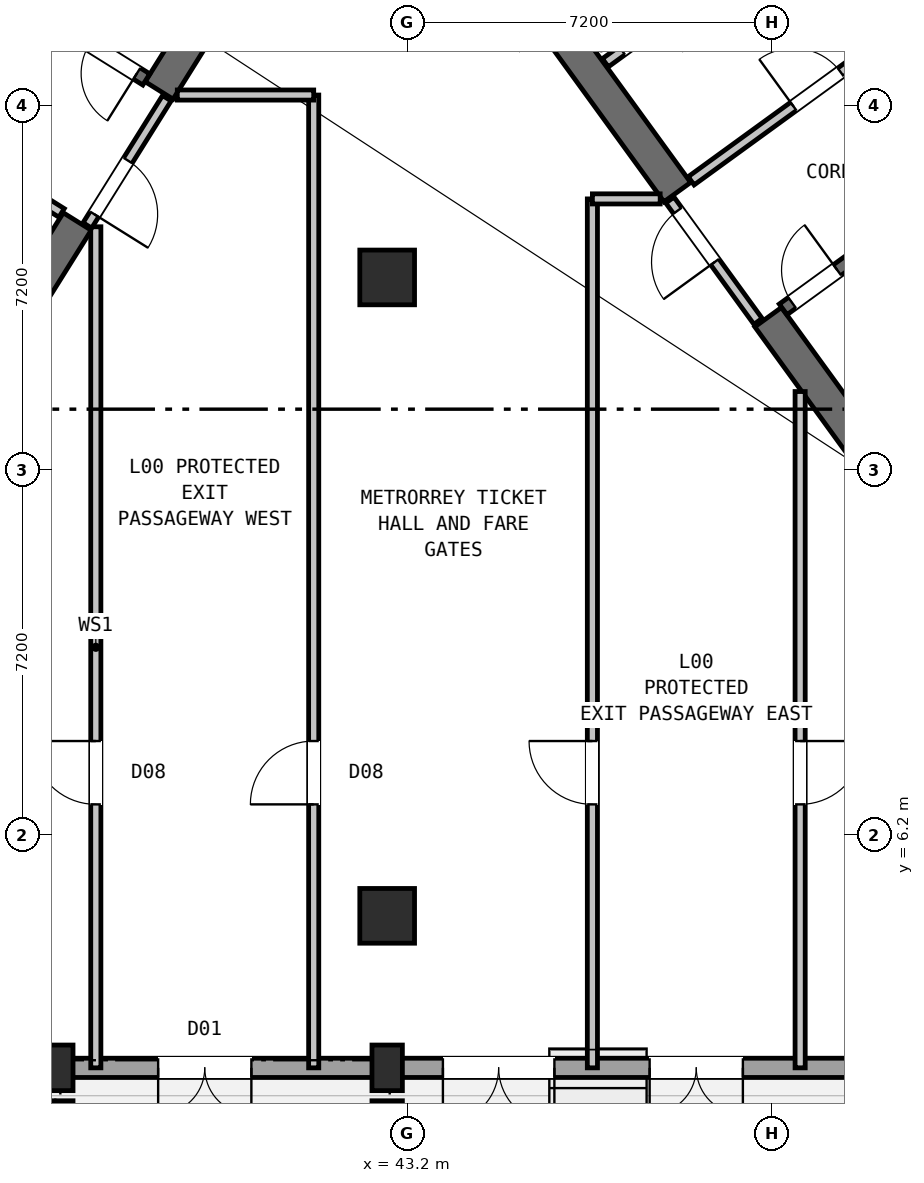
"""IFC4 building model, lengths in metres.
Left out: names, types, materials, properties, quantities, classifications, styles, units other than length and angle.
Written with IfcOpenShell. Run it as: python <this file> out.ifc"""

import sys

from ifc_helpers import new_model, si_unit, direction, frame, frame_2d, origin, origin_2d, place, context, subcontext, project, spatial, rectangle, hollow_rectangle, extrude, source, transform, mapped, element, fill, save


model = new_model("IFC4")
c1 = context("Model", 3, precision=1e-05, world=origin(), true_north=direction((0.0, 1.0)))
c2 = subcontext(c1, "Body", "Model", "MODEL_VIEW")
j1 = project(units=[si_unit("LENGTHUNIT", "METRE"), si_unit("PLANEANGLEUNIT", "RADIAN")], contexts=[c1])
p1 = place(None, origin())
s1 = spatial("IfcSite", under=j1, at=p1, CompositionType="ELEMENT")
p2 = place(p1, origin())
s2 = spatial("IfcBuilding", under=s1, at=p2, CompositionType="ELEMENT")
p3 = place(p2, origin())
s3 = spatial("IfcBuildingStorey", under=s2, at=p3, CompositionType="ELEMENT", Elevation=0.0)
p4 = place(p3, frame((40.168, 23.88, 0.0), z_axis=(0.0, 0.0, 1.0), x_axis=(-0.529893103397, -0.8480644427, 0.0)))
e1 = element("IfcWall", 1, at=p4, inside=s3, PredefinedType="SHEAR", context=c2, shape_type="SweptSolid", body=[
    extrude(rectangle(XDim=3.525, YDim=0.65, at=frame_2d((1.763, 0.0))), origin(), (0.0, 0.0, 1.0), 5.05),
])
p5 = place(p3, frame((36.683, 18.304, 0.0), z_axis=(0.0, 0.0, 1.0), x_axis=(-0.529899109053, -0.848060690178, 0.0)))
e2 = element("IfcWall", 2, at=p5, inside=s3, PredefinedType="SHEAR", context=c2, shape_type="SweptSolid", body=[
    extrude(rectangle(XDim=6.375, YDim=0.65, at=frame_2d((3.188, 0.0))), origin(), (0.0, 0.0, 1.0), 5.05),
])
p6 = place(p3, frame((52.39, 13.564, 0.0), z_axis=(0.0, 0.0, 1.0), x_axis=(-0.58779688989, 0.809008539037, 0.0)))
e3 = element("IfcWall", 3, at=p6, inside=s3, PredefinedType="SHEAR", context=c2, shape_type="SweptSolid", body=[
    extrude(rectangle(XDim=3.525, YDim=0.65, at=frame_2d((1.763, 0.0))), origin(), (0.0, 0.0, 1.0), 5.05),
])
p7 = place(p3, frame((48.526, 18.884, 0.0), z_axis=(0.0, 0.0, 1.0), x_axis=(-0.58777996584, 0.809020835181, 0.0)))
e4 = element("IfcWall", 4, at=p7, inside=s3, PredefinedType="SHEAR", context=c2, shape_type="SweptSolid", body=[
    extrude(rectangle(XDim=6.375, YDim=0.65, at=frame_2d((3.188, 0.0))), origin(), (0.0, 0.0, 1.0), 5.05),
])
m1 = source(origin(), c2, "Body", "SweptSolid", [
    extrude(hollow_rectangle(XDim=1.08, YDim=1.08, WallThickness=0.04, at=origin_2d()), origin(), (0.0, 0.0, 1.0), 5.4),
])
for number, where, z_axis, x_axis in (
    (5, (42.8, 4.6, 0.0), (0.0, 0.0, 1.0), (1.0, 0.0, 0.0)),
    (6, (42.8, 17.2, 0.0), (0.0, 0.0, 1.0), (1.0, 0.0, 0.0)),
):
    element("IfcColumn", number, at=place(p3, frame(where, z_axis=z_axis, x_axis=x_axis)), inside=s3, PredefinedType="COLUMN", context=c2, shape_type="MappedRepresentation", body=[
        mapped(m1, transform((0.0, 0.0, 0.0), scale=1.0)),
    ])
m2 = source(origin(), c2, "Body", "SweptSolid", [
    extrude(rectangle(XDim=0.6, YDim=0.9, at=origin_2d()), origin(), (0.0, 0.0, 1.0), 4.34),
])
p8 = place(p3, frame((36.3, 0.5, -0.16), z_axis=(0.0, 0.0, 1.0), x_axis=(1.0, 0.0, 0.0)))
e7 = element("IfcColumn", 7, at=p8, inside=s3, PredefinedType="PILASTER", context=c2, shape_type="MappedRepresentation", body=[
    mapped(m2, transform((0.0, 0.0, 0.0), scale=1.0)),
])
m3 = source(origin(), c2, "Body", "SweptSolid", [
    extrude(rectangle(XDim=0.6, YDim=0.9, at=origin_2d()), origin(), (0.0, 0.0, 1.0), 4.53),
])
p9 = place(p3, frame((36.3, 1.6, -0.35), z_axis=(0.0, 0.0, 1.0), x_axis=(1.0, 0.0, 0.0)))
e8 = element("IfcColumn", 8, at=p9, inside=s3, PredefinedType="PILASTER", context=c2, shape_type="MappedRepresentation", body=[
    mapped(m3, transform((0.0, 0.0, 0.0), scale=1.0)),
])
p10 = place(p3, frame((42.8, 0.5, -0.16), z_axis=(0.0, 0.0, 1.0), x_axis=(1.0, 0.0, 0.0)))
e9 = element("IfcColumn", 9, at=p10, inside=s3, PredefinedType="PILASTER", context=c2, shape_type="MappedRepresentation", body=[
    mapped(m2, transform((0.0, 0.0, 0.0), scale=1.0)),
])
p11 = place(p3, frame((42.8, 1.6, -0.35), z_axis=(0.0, 0.0, 1.0), x_axis=(1.0, 0.0, 0.0)))
e10 = element("IfcColumn", 10, at=p11, inside=s3, PredefinedType="PILASTER", context=c2, shape_type="MappedRepresentation", body=[
    mapped(m3, transform((0.0, 0.0, 0.0), scale=1.0)),
])
p12 = place(p3, frame((67.117, 1.6, 0.0), z_axis=(0.0, 0.0, 1.0), x_axis=(-1.0, 0.0, 0.0)))
e11 = element("IfcWall", 11, at=p12, inside=s3, PredefinedType="STANDARD", context=c2, shape_type="SweptSolid", body=[
    extrude(rectangle(XDim=62.234, YDim=0.38, at=frame_2d((31.117, 0.0))), origin(), (0.0, 0.0, 1.0), 3.755),
])
p13 = place(p12, frame((53.077, 0.0, 0.0)))
e12 = element("IfcOpeningElement", 12, at=p13, cuts=e11, PredefinedType="OPENING", context=c2, shape_type="SweptSolid", body=[
    extrude(rectangle(XDim=1.84, YDim=2.4, at=frame_2d((0.92, 1.2))), frame((0.0, 0.2, 0.0), z_axis=(0.0, -1.0, 0.0), x_axis=(1.0, 0.0, 0.0)), (0.0, 0.0, 1.0), 0.4),
])
p14 = place(p12, frame((39.517, 0.0, 0.0)))
e13 = element("IfcOpeningElement", 13, at=p14, cuts=e11, PredefinedType="OPENING", context=c2, shape_type="SweptSolid", body=[
    extrude(rectangle(XDim=2.2, YDim=2.6, at=frame_2d((1.1, 1.3))), frame((0.0, 0.2, 0.0), z_axis=(0.0, -1.0, 0.0), x_axis=(1.0, 0.0, 0.0)), (0.0, 0.0, 1.0), 0.4),
])
p15 = place(p12, frame((32.917, 0.0, 0.0)))
e14 = element("IfcOpeningElement", 14, at=p15, cuts=e11, PredefinedType="OPENING", context=c2, shape_type="SweptSolid", body=[
    extrude(rectangle(XDim=2.2, YDim=2.6, at=frame_2d((1.1, 1.3))), frame((0.0, 0.2, 0.0), z_axis=(0.0, -1.0, 0.0), x_axis=(1.0, 0.0, 0.0)), (0.0, 0.0, 1.0), 0.4),
])
p16 = place(p12, frame((26.997, 0.0, 0.0)))
e15 = element("IfcOpeningElement", 15, at=p16, cuts=e11, PredefinedType="OPENING", context=c2, shape_type="SweptSolid", body=[
    extrude(rectangle(XDim=1.84, YDim=2.4, at=frame_2d((0.92, 1.2))), frame((0.0, 0.2, 0.0), z_axis=(0.0, -1.0, 0.0), x_axis=(1.0, 0.0, 0.0)), (0.0, 0.0, 1.0), 0.4),
])
p17 = place(p12, frame((21.017, 0.0, 0.0)))
e16 = element("IfcOpeningElement", 16, at=p17, cuts=e11, PredefinedType="OPENING", context=c2, shape_type="SweptSolid", body=[
    extrude(rectangle(XDim=2.2, YDim=2.6, at=frame_2d((1.1, 1.3))), frame((0.0, 0.2, 0.0), z_axis=(0.0, -1.0, 0.0), x_axis=(1.0, 0.0, 0.0)), (0.0, 0.0, 1.0), 0.4),
])
p18 = place(p12, frame((17.297, 0.0, 0.0)))
e17 = element("IfcOpeningElement", 17, at=p18, cuts=e11, PredefinedType="OPENING", context=c2, shape_type="SweptSolid", body=[
    extrude(rectangle(XDim=1.84, YDim=2.4, at=frame_2d((0.92, 1.2))), frame((0.0, 0.2, 0.0), z_axis=(0.0, -1.0, 0.0), x_axis=(1.0, 0.0, 0.0)), (0.0, 0.0, 1.0), 0.4),
])
p19 = place(p12, frame((12.567, 0.0, 0.0)))
e18 = element("IfcOpeningElement", 18, at=p19, cuts=e11, PredefinedType="OPENING", context=c2, shape_type="SweptSolid", body=[
    extrude(rectangle(XDim=2.2, YDim=2.6, at=frame_2d((1.1, 1.3))), frame((0.0, 0.2, 0.0), z_axis=(0.0, -1.0, 0.0), x_axis=(1.0, 0.0, 0.0)), (0.0, 0.0, 1.0), 0.4),
])
p20 = place(p12, frame((6.277, 0.0, 0.0)))
e19 = element("IfcOpeningElement", 19, at=p20, cuts=e11, PredefinedType="OPENING", context=c2, shape_type="SweptSolid", body=[
    extrude(rectangle(XDim=1.84, YDim=2.4, at=frame_2d((0.92, 1.2))), frame((0.0, 0.2, 0.0), z_axis=(0.0, -1.0, 0.0), x_axis=(1.0, 0.0, 0.0)), (0.0, 0.0, 1.0), 0.4),
])
p21 = place(p3, frame((38.046, 21.108, 0.0), z_axis=(0.0, 0.0, 1.0), x_axis=(-0.848054434086, 0.529909121291, 0.0)))
e20 = element("IfcWall", 20, at=p21, inside=s3, PredefinedType="SHEAR", context=c2, shape_type="SweptSolid", body=[
    extrude(rectangle(XDim=7.33, YDim=0.26, at=frame_2d((3.665, 0.0))), origin(), (0.0, 0.0, 1.0), 5.05),
])
p22 = place(p21, frame((0.22, 0.0, 0.0)))
e21 = element("IfcOpeningElement", 21, at=p22, cuts=e20, PredefinedType="OPENING", context=c2, shape_type="SweptSolid", body=[
    extrude(rectangle(XDim=1.1, YDim=2.1, at=frame_2d((0.55, 1.05))), frame((0.0, 0.14, 0.0), z_axis=(0.0, -1.0, 0.0), x_axis=(1.0, 0.0, 0.0)), (0.0, 0.0, 1.0), 0.28),
])
p23 = place(p3, frame((36.374, 18.474, 0.0), z_axis=(0.0, 0.0, 1.0), x_axis=(-0.848051071577, 0.529914502535, 0.0)))
e22 = element("IfcWall", 22, at=p23, inside=s3, PredefinedType="STANDARD", context=c2, shape_type="SweptSolid", body=[
    extrude(rectangle(XDim=5.718, YDim=0.2, at=frame_2d((2.859, 0.0))), origin(), (0.0, 0.0, 1.0), 5.04),
])
p24 = place(p23, frame((2.498, 0.0, 0.0)))
e23 = element("IfcOpeningElement", 23, at=p24, cuts=e22, PredefinedType="OPENING", context=c2, shape_type="SweptSolid", body=[
    extrude(rectangle(XDim=1.15, YDim=2.1, at=frame_2d((0.575, 1.05))), frame((0.0, 0.11, 0.0), z_axis=(0.0, -1.0, 0.0), x_axis=(1.0, 0.0, 0.0)), (0.0, 0.0, 1.0), 0.22),
])
p25 = place(p3, frame((50.615, 16.57, 0.0), z_axis=(0.0, 0.0, 1.0), x_axis=(0.809028366311, 0.587769599847, 0.0)))
e24 = element("IfcWall", 24, at=p25, inside=s3, PredefinedType="SHEAR", context=c2, shape_type="SweptSolid", body=[
    extrude(rectangle(XDim=7.33, YDim=0.26, at=frame_2d((3.665, 0.0))), origin(), (0.0, 0.0, 1.0), 5.05),
])
p26 = place(p25, frame((0.22, 0.0, 0.0)))
e25 = element("IfcOpeningElement", 25, at=p26, cuts=e24, PredefinedType="OPENING", context=c2, shape_type="SweptSolid", body=[
    extrude(rectangle(XDim=1.1, YDim=2.1, at=frame_2d((0.55, 1.05))), frame((0.0, 0.14, 0.0), z_axis=(0.0, -1.0, 0.0), x_axis=(1.0, 0.0, 0.0)), (0.0, 0.0, 1.0), 0.28),
])
p27 = place(p3, frame((47.106, 21.437, 0.0), z_axis=(0.0, 0.0, 1.0), x_axis=(0.809012514015, 0.58779141893, 0.0)))
e26 = element("IfcWall", 26, at=p27, inside=s3, PredefinedType="STANDARD", context=c2, shape_type="SweptSolid", body=[
    extrude(rectangle(XDim=3.398, YDim=0.2, at=frame_2d((1.699, 0.0))), origin(), (0.0, 0.0, 1.0), 5.04),
])
p28 = place(p27, frame((0.408, 0.0, 0.0)))
e27 = element("IfcOpeningElement", 27, at=p28, cuts=e26, PredefinedType="OPENING", context=c2, shape_type="SweptSolid", body=[
    extrude(rectangle(XDim=1.3, YDim=2.2, at=frame_2d((0.65, 1.1))), frame((0.0, 0.11, 0.0), z_axis=(0.0, -1.0, 0.0), x_axis=(1.0, 0.0, 0.0)), (0.0, 0.0, 1.0), 0.22),
])
p29 = place(p3, frame((48.799, 19.107, 0.0), z_axis=(0.0, 0.0, 1.0), x_axis=(0.809012959416, 0.587790805897, 0.0)))
e28 = element("IfcWall", 28, at=p29, inside=s3, PredefinedType="STANDARD", context=c2, shape_type="SweptSolid", body=[
    extrude(rectangle(XDim=5.718, YDim=0.2, at=frame_2d((2.859, 0.0))), origin(), (0.0, 0.0, 1.0), 5.04),
])
p30 = place(p29, frame((2.498, 0.0, 0.0)))
e29 = element("IfcOpeningElement", 29, at=p30, cuts=e28, PredefinedType="OPENING", context=c2, shape_type="SweptSolid", body=[
    extrude(rectangle(XDim=1.15, YDim=2.1, at=frame_2d((0.575, 1.05))), frame((0.0, 0.11, 0.0), z_axis=(0.0, -1.0, 0.0), x_axis=(1.0, 0.0, 0.0)), (0.0, 0.0, 1.0), 0.22),
])
p31 = place(p3, frame((37.05, 1.6, 0.0), z_axis=(0.0, 0.0, 1.0), x_axis=(0.0, 1.0, 0.0)))
e30 = element("IfcWall", 30, at=p31, inside=s3, PredefinedType="STANDARD", context=c2, shape_type="SweptSolid", body=[
    extrude(rectangle(XDim=16.6, YDim=0.2, at=frame_2d((8.3, 0.0))), origin(), (0.0, 0.0, 1.0), 5.04),
])
p32 = place(p31, frame((5.2, 0.0, 0.0)))
e31 = element("IfcOpeningElement", 31, at=p32, cuts=e30, PredefinedType="OPENING", context=c2, shape_type="SweptSolid", body=[
    extrude(rectangle(XDim=1.25, YDim=2.15, at=frame_2d((0.625, 1.075))), frame((0.0, 0.11, 0.0), z_axis=(0.0, -1.0, 0.0), x_axis=(1.0, 0.0, 0.0)), (0.0, 0.0, 1.0), 0.22),
])
p33 = place(p3, frame((41.35, 1.6, 0.0), z_axis=(0.0, 0.0, 1.0), x_axis=(0.0, 1.0, 0.0)))
e32 = element("IfcWall", 32, at=p33, inside=s3, PredefinedType="STANDARD", context=c2, shape_type="SweptSolid", body=[
    extrude(rectangle(XDim=19.2, YDim=0.2, at=frame_2d((9.6, 0.0))), origin(), (0.0, 0.0, 1.0), 5.04),
])
p34 = place(p33, frame((5.2, 0.0, 0.0)))
e33 = element("IfcOpeningElement", 33, at=p34, cuts=e32, PredefinedType="OPENING", context=c2, shape_type="SweptSolid", body=[
    extrude(rectangle(XDim=1.25, YDim=2.15, at=frame_2d((0.625, 1.075))), frame((0.0, 0.11, 0.0), z_axis=(0.0, -1.0, 0.0), x_axis=(1.0, 0.0, 0.0)), (0.0, 0.0, 1.0), 0.22),
])
p35 = place(p3, frame((38.658, 20.8, 0.0), z_axis=(0.0, 0.0, 1.0), x_axis=(1.0, 0.0, 0.0)))
e34 = element("IfcWall", 34, at=p35, inside=s3, PredefinedType="STANDARD", context=c2, shape_type="SweptSolid", body=[
    extrude(rectangle(XDim=2.692, YDim=0.2, at=frame_2d((1.346, 0.0))), origin(), (0.0, 0.0, 1.0), 5.04),
])
p36 = place(p3, frame((46.85, 1.6, 0.0), z_axis=(0.0, 0.0, 1.0), x_axis=(0.0, 1.0, 0.0)))
e35 = element("IfcWall", 35, at=p36, inside=s3, PredefinedType="STANDARD", context=c2, shape_type="SweptSolid", body=[
    extrude(rectangle(XDim=17.15, YDim=0.2, at=frame_2d((8.575, 0.0))), origin(), (0.0, 0.0, 1.0), 5.04),
])
p37 = place(p36, frame((5.2, 0.0, 0.0)))
e36 = element("IfcOpeningElement", 36, at=p37, cuts=e35, PredefinedType="OPENING", context=c2, shape_type="SweptSolid", body=[
    extrude(rectangle(XDim=1.25, YDim=2.15, at=frame_2d((0.625, 1.075))), frame((0.0, 0.11, 0.0), z_axis=(0.0, -1.0, 0.0), x_axis=(1.0, 0.0, 0.0)), (0.0, 0.0, 1.0), 0.22),
])
p38 = place(p3, frame((50.95, 1.6, 0.0), z_axis=(0.0, 0.0, 1.0), x_axis=(0.0, 1.0, 0.0)))
e37 = element("IfcWall", 37, at=p38, inside=s3, PredefinedType="STANDARD", context=c2, shape_type="SweptSolid", body=[
    extrude(rectangle(XDim=13.348, YDim=0.2, at=frame_2d((6.674, 0.0))), origin(), (0.0, 0.0, 1.0), 5.04),
])
p39 = place(p38, frame((5.2, 0.0, 0.0)))
e38 = element("IfcOpeningElement", 38, at=p39, cuts=e37, PredefinedType="OPENING", context=c2, shape_type="SweptSolid", body=[
    extrude(rectangle(XDim=1.25, YDim=2.15, at=frame_2d((0.625, 1.075))), frame((0.0, 0.11, 0.0), z_axis=(0.0, -1.0, 0.0), x_axis=(1.0, 0.0, 0.0)), (0.0, 0.0, 1.0), 0.22),
])
p40 = place(p3, frame((46.85, 18.75, 0.0), z_axis=(0.0, 0.0, 1.0), x_axis=(1.0, 0.0, 0.0)))
e39 = element("IfcWall", 39, at=p40, inside=s3, PredefinedType="STANDARD", context=c2, shape_type="SweptSolid", body=[
    extrude(rectangle(XDim=1.338, YDim=0.2, at=frame_2d((0.669, 0.0))), origin(), (0.0, 0.0, 1.0), 5.04),
])
p41 = place(p3, frame((38.451, 20.737, 0.0), z_axis=(0.0, 0.0, 1.0), x_axis=(-0.529924799939, -0.848044637038, 0.0)))
e40 = element("IfcWall", 40, at=p41, inside=s3, PredefinedType="STANDARD", context=c2, shape_type="SweptSolid", body=[
    extrude(rectangle(XDim=2.96, YDim=0.2, at=frame_2d((1.48, 0.0))), origin(), (0.0, 0.0, 1.0), 5.04),
])
p42 = place(p41, frame((1.45, 0.0, 0.0)))
e41 = element("IfcOpeningElement", 41, at=p42, cuts=e40, PredefinedType="OPENING", context=c2, shape_type="SweptSolid", body=[
    extrude(rectangle(XDim=1.25, YDim=2.15, at=frame_2d((0.625, 1.075))), frame((0.0, 0.11, 0.0), z_axis=(0.0, -1.0, 0.0), x_axis=(1.0, 0.0, 0.0)), (0.0, 0.0, 1.0), 0.22),
])
p43 = place(p3, frame((50.119, 16.333, 0.0), z_axis=(0.0, 0.0, 1.0), x_axis=(-0.587749856981, 0.809042709391, 0.0)))
e42 = element("IfcWall", 42, at=p43, inside=s3, PredefinedType="STANDARD", context=c2, shape_type="SweptSolid", body=[
    extrude(rectangle(XDim=2.96, YDim=0.2, at=frame_2d((1.48, 0.0))), origin(), (0.0, 0.0, 1.0), 5.04),
])
p44 = place(p43, frame((1.45, 0.0, 0.0)))
e43 = element("IfcOpeningElement", 43, at=p44, cuts=e42, PredefinedType="OPENING", context=c2, shape_type="SweptSolid", body=[
    extrude(rectangle(XDim=1.25, YDim=2.15, at=frame_2d((0.625, 1.075))), frame((0.0, 0.11, 0.0), z_axis=(0.0, -1.0, 0.0), x_axis=(1.0, 0.0, 0.0)), (0.0, 0.0, 1.0), 0.22),
])
m4 = source(origin(), c2, "Body", "SweptSolid", [
    extrude(rectangle(XDim=1.84, YDim=2.4, at=frame_2d((0.92, 1.2))), frame((0.0, 0.025, 0.0), z_axis=(0.0, -1.0, 0.0), x_axis=(1.0, 0.0, 0.0)), (0.0, 0.0, 1.0), 0.05),
])
p45 = place(p16, origin())
e44 = element("IfcDoor", 44, at=p45, inside=s3, OperationType="DOUBLE_DOOR_SINGLE_SWING", PredefinedType="DOOR", context=c2, shape_type="MappedRepresentation", body=[
    mapped(m4, transform((0.0, 0.0, 0.0), scale=1.0)),
])
fill(e15, e44)
m5 = source(origin(), c2, "Body", "SweptSolid", [
    extrude(rectangle(XDim=2.2, YDim=2.6, at=frame_2d((1.1, 1.3))), frame((0.0, 0.025, 0.0), z_axis=(0.0, -1.0, 0.0), x_axis=(1.0, 0.0, 0.0)), (0.0, 0.0, 1.0), 0.05),
])
p46 = place(p17, origin())
e45 = element("IfcDoor", 45, at=p46, inside=s3, OperationType="DOUBLE_DOOR_SINGLE_SWING", PredefinedType="DOOR", context=c2, shape_type="MappedRepresentation", body=[
    mapped(m5, transform((0.0, 0.0, 0.0), scale=1.0)),
])
fill(e16, e45)
p47 = place(p18, origin())
e46 = element("IfcDoor", 46, at=p47, inside=s3, OperationType="DOUBLE_DOOR_SINGLE_SWING", PredefinedType="DOOR", context=c2, shape_type="MappedRepresentation", body=[
    mapped(m4, transform((0.0, 0.0, 0.0), scale=1.0)),
])
fill(e17, e46)
m6 = source(origin(), c2, "Body", "SweptSolid", [
    extrude(rectangle(XDim=1.1, YDim=2.1, at=frame_2d((0.55, 1.05))), frame((0.0, 0.025, 0.0), z_axis=(0.0, -1.0, 0.0), x_axis=(1.0, 0.0, 0.0)), (0.0, 0.0, 1.0), 0.05),
])
p48 = place(p22, origin())
e47 = element("IfcDoor", 47, at=p48, inside=s3, OperationType="SINGLE_SWING_LEFT", PredefinedType="DOOR", context=c2, shape_type="MappedRepresentation", body=[
    mapped(m6, transform((0.0, 0.0, 0.0), scale=1.0)),
])
fill(e21, e47)
p49 = place(p26, origin())
e48 = element("IfcDoor", 48, at=p49, inside=s3, OperationType="SINGLE_SWING_RIGHT", PredefinedType="DOOR", context=c2, shape_type="MappedRepresentation", body=[
    mapped(m6, transform((0.0, 0.0, 0.0), scale=1.0)),
])
fill(e25, e48)
m7 = source(origin(), c2, "Body", "SweptSolid", [
    extrude(rectangle(XDim=1.15, YDim=2.1, at=frame_2d((0.575, 1.05))), frame((0.0, 0.025, 0.0), z_axis=(0.0, -1.0, 0.0), x_axis=(1.0, 0.0, 0.0)), (0.0, 0.0, 1.0), 0.05),
])
p50 = place(p30, origin())
e49 = element("IfcDoor", 49, at=p50, inside=s3, OperationType="SINGLE_SWING_LEFT", PredefinedType="DOOR", context=c2, shape_type="MappedRepresentation", body=[
    mapped(m7, transform((0.0, 0.0, 0.0), scale=1.0)),
])
fill(e29, e49)
m8 = source(origin(), c2, "Body", "SweptSolid", [
    extrude(rectangle(XDim=1.25, YDim=2.15, at=frame_2d((0.625, 1.075))), frame((0.0, 0.025, 0.0), z_axis=(0.0, -1.0, 0.0), x_axis=(1.0, 0.0, 0.0)), (0.0, 0.0, 1.0), 0.05),
])
p51 = place(p32, origin())
e50 = element("IfcDoor", 50, at=p51, inside=s3, OperationType="SINGLE_SWING_RIGHT", PredefinedType="DOOR", context=c2, shape_type="MappedRepresentation", body=[
    mapped(m8, transform((0.0, 0.0, 0.0), scale=1.0)),
])
fill(e31, e50)
p52 = place(p34, origin())
e51 = element("IfcDoor", 51, at=p52, inside=s3, OperationType="SINGLE_SWING_LEFT", PredefinedType="DOOR", context=c2, shape_type="MappedRepresentation", body=[
    mapped(m8, transform((0.0, 0.0, 0.0), scale=1.0)),
])
fill(e33, e51)
p53 = place(p37, origin())
e52 = element("IfcDoor", 52, at=p53, inside=s3, OperationType="SINGLE_SWING_RIGHT", PredefinedType="DOOR", context=c2, shape_type="MappedRepresentation", body=[
    mapped(m8, transform((0.0, 0.0, 0.0), scale=1.0)),
])
fill(e36, e52)
p54 = place(p39, frame((1.25, 0.0, 0.0), z_axis=(0.0, 0.0, 1.0), x_axis=(-1.0, 0.0, 0.0)))
e53 = element("IfcDoor", 53, at=p54, inside=s3, OperationType="SINGLE_SWING_LEFT", PredefinedType="DOOR", context=c2, shape_type="MappedRepresentation", body=[
    mapped(m8, transform((0.0, 0.0, 0.0), scale=1.0)),
])
fill(e38, e53)
p55 = place(p42, origin())
e54 = element("IfcDoor", 54, at=p55, inside=s3, OperationType="SINGLE_SWING_RIGHT", PredefinedType="DOOR", context=c2, shape_type="MappedRepresentation", body=[
    mapped(m8, transform((0.0, 0.0, 0.0), scale=1.0)),
])
fill(e41, e54)
p56 = place(p44, origin())
e55 = element("IfcDoor", 55, at=p56, inside=s3, OperationType="SINGLE_SWING_LEFT", PredefinedType="DOOR", context=c2, shape_type="MappedRepresentation", body=[
    mapped(m8, transform((0.0, 0.0, 0.0), scale=1.0)),
])
fill(e43, e55)
save(model, sys.argv[1])
